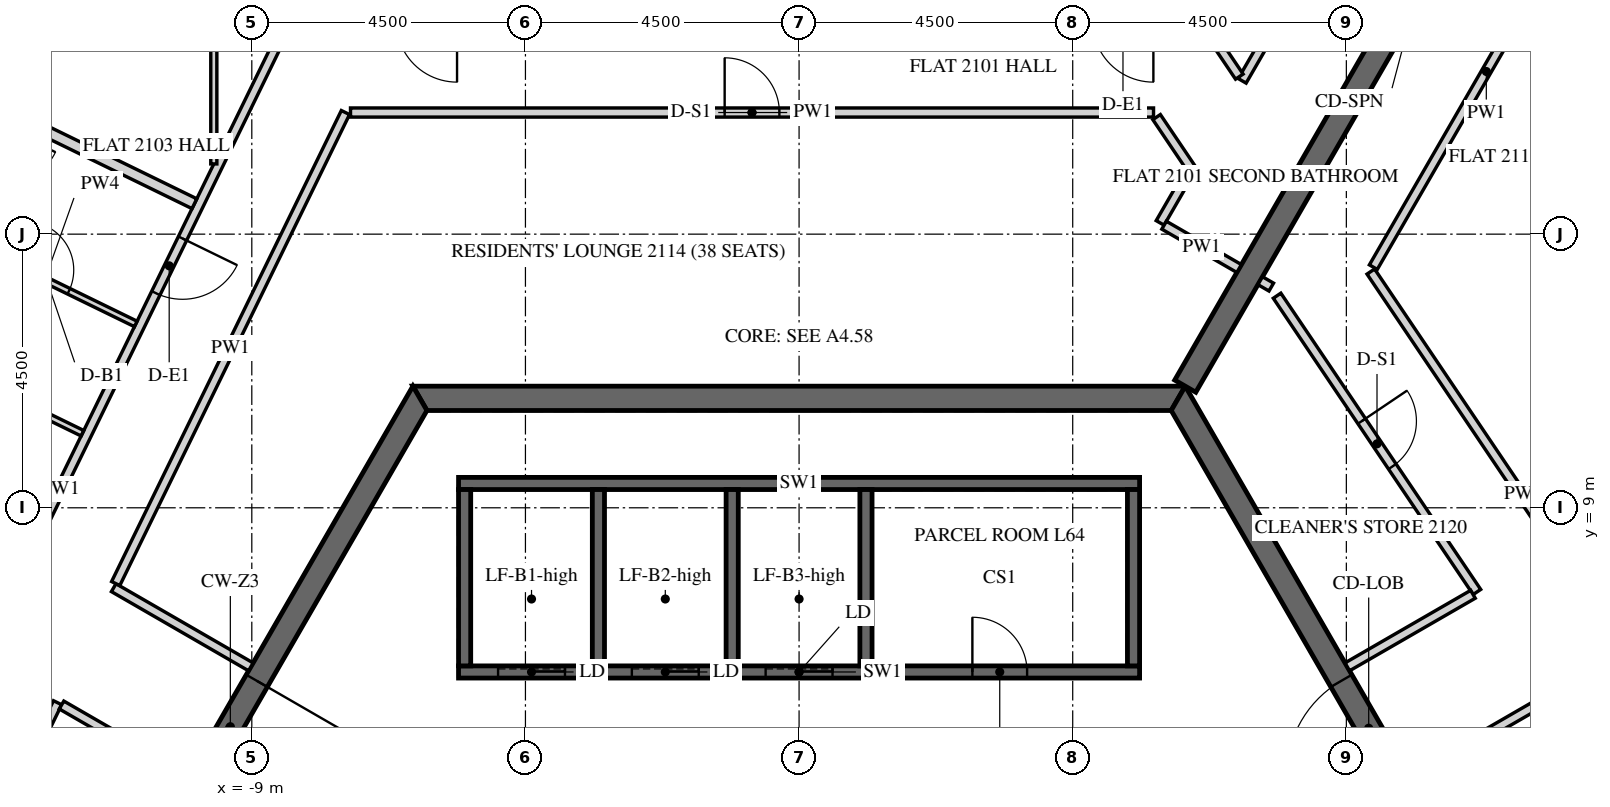
"""IFC4 building model, lengths in metres.
Left out: names, types, materials, properties, quantities, classifications, styles, units other than length and angle.
Written with IfcOpenShell. Run it as: python <this file> out.ifc"""

import sys

from ifc_helpers import new_model, si_unit, direction, frame, frame_2d, origin, place, context, subcontext, project, spatial, polyline, rectangle, outline, extrude, element, fill, save


model = new_model("IFC4")
c1 = context("Model", 3, precision=1e-05, world=origin(), true_north=direction((0.0, 1.0)))
c2 = subcontext(c1, "Body", "Model", "MODEL_VIEW")
j1 = project(units=[si_unit("LENGTHUNIT", "METRE"), si_unit("PLANEANGLEUNIT", "RADIAN")], contexts=[c1])
p1 = place(None, origin())
s1 = spatial("IfcSite", under=j1, at=p1, CompositionType="ELEMENT")
p2 = place(p1, origin())
s2 = spatial("IfcBuilding", under=s1, at=p2, CompositionType="ELEMENT")
p3 = place(p2, frame((0.0, 0.0, 267.9)))
s3 = spatial("IfcBuildingStorey", under=s2, at=p3, CompositionType="ELEMENT", Elevation=267.9)
p4 = place(p3, frame((-6.235, 10.8, -0.15), z_axis=(0.0, 0.0, 1.0), x_axis=(-0.499996419489, -0.866027470984, 0.0)))
e1 = element("IfcWall", 1, at=p4, inside=s3, PredefinedType="SHEAR", context=c2, shape_type="SweptSolid", body=[
    extrude(outline(polyline([(-0.115, -0.2), (12.586, -0.2), (12.355, 0.2), (0.115, 0.2), (-0.115, -0.2)])), origin(), (0.0, 0.0, 1.0), 3.9),
])
p5 = place(p4, frame((5.364, 0.0, 0.15)))
e2 = element("IfcOpeningElement", 2, at=p5, cuts=e1, PredefinedType="OPENING", context=c2, shape_type="SweptSolid", body=[
    extrude(rectangle(XDim=1.8, YDim=2.4, at=frame_2d((0.9, 1.2))), frame((0.0, 0.21, 0.0), z_axis=(0.0, -1.0, 0.0), x_axis=(1.0, 0.0, 0.0)), (0.0, 0.0, 1.0), 0.42),
])
p6 = place(p3, frame((12.471, 0.0, -0.15), z_axis=(0.0, 0.0, 1.0), x_axis=(-0.499996419489, 0.866027470984, 0.0)))
e3 = element("IfcWall", 3, at=p6, inside=s3, PredefinedType="SHEAR", context=c2, shape_type="SweptSolid", body=[
    extrude(outline(polyline([(-0.115, -0.2), (12.586, -0.2), (12.355, 0.2), (0.115, 0.2), (-0.115, -0.2)])), origin(), (0.0, 0.0, 1.0), 3.9),
])
p7 = place(p6, frame((5.306, 0.0, 0.15)))
e4 = element("IfcOpeningElement", 4, at=p7, cuts=e3, PredefinedType="OPENING", context=c2, shape_type="SweptSolid", body=[
    extrude(rectangle(XDim=1.8, YDim=2.4, at=frame_2d((0.9, 1.2))), frame((0.0, 0.21, 0.0), z_axis=(0.0, -1.0, 0.0), x_axis=(1.0, 0.0, 0.0)), (0.0, 0.0, 1.0), 0.42),
])
p8 = place(p3, frame((6.235, 10.8, -0.15), z_axis=(0.0, 0.0, 1.0), x_axis=(-1.0, 0.0, 0.0)))
e5 = element("IfcWall", 5, at=p8, inside=s3, PredefinedType="SHEAR", context=c2, shape_type="SweptSolid", body=[
    extrude(outline(polyline([(-0.115, -0.2), (12.586, -0.2), (12.355, 0.2), (0.115, 0.2), (-0.115, -0.2)])), origin(), (0.0, 0.0, 1.0), 3.9),
])
p9 = place(p3, frame((6.351, 11.0, -0.15), z_axis=(0.0, 0.0, 1.0), x_axis=(0.499998894578, 0.866026041999, 0.0)))
e6 = element("IfcWall", 6, at=p9, inside=s3, PredefinedType="SHEAR", context=c2, shape_type="SweptSolid", body=[
    extrude(rectangle(XDim=15.544, YDim=0.4, at=frame_2d((7.772, 0.0))), origin(), (0.0, 0.0, 1.0), 3.9),
])
p10 = place(p9, frame((6.872, 0.0, 0.15)))
e7 = element("IfcOpeningElement", 7, at=p10, cuts=e6, PredefinedType="OPENING", context=c2, shape_type="SweptSolid", body=[
    extrude(rectangle(XDim=1.8, YDim=2.4, at=frame_2d((0.9, 1.2))), frame((0.0, 0.21, 0.0), z_axis=(0.0, -1.0, 0.0), x_axis=(1.0, 0.0, 0.0)), (0.0, 0.0, 1.0), 0.42),
])
p11 = place(p3, frame((-5.6, 6.3, -0.25), z_axis=(0.0, 0.0, 1.0), x_axis=(1.0, 0.0, 0.0)))
e8 = element("IfcWall", 8, at=p11, inside=s3, PredefinedType="SHEAR", context=c2, shape_type="SweptSolid", body=[
    extrude(rectangle(XDim=11.2, YDim=0.2, at=frame_2d((5.6, 0.0))), origin(), (0.0, 0.0, 1.0), 3.9),
])
p12 = place(p11, frame((8.45, 0.0, 0.25)))
e9 = element("IfcOpeningElement", 9, at=p12, cuts=e8, PredefinedType="OPENING", context=c2, shape_type="SweptSolid", body=[
    extrude(rectangle(XDim=0.9, YDim=2.1, at=frame_2d((0.45, 1.05))), frame((0.0, 0.11, 0.0), z_axis=(0.0, -1.0, 0.0), x_axis=(1.0, 0.0, 0.0)), (0.0, 0.0, 1.0), 0.22),
])
p13 = place(p11, frame((0.65, 0.0, 0.25)))
e10 = element("IfcOpeningElement", 10, at=p13, cuts=e8, PredefinedType="OPENING", context=c2, shape_type="SweptSolid", body=[
    extrude(rectangle(XDim=1.1, YDim=2.1, at=frame_2d((0.55, 1.05))), frame((0.0, 0.11, 0.0), z_axis=(0.0, -1.0, 0.0), x_axis=(1.0, 0.0, 0.0)), (0.0, 0.0, 1.0), 0.22),
])
p14 = place(p11, frame((2.85, 0.0, 0.25)))
e11 = element("IfcOpeningElement", 11, at=p14, cuts=e8, PredefinedType="OPENING", context=c2, shape_type="SweptSolid", body=[
    extrude(rectangle(XDim=1.1, YDim=2.1, at=frame_2d((0.55, 1.05))), frame((0.0, 0.11, 0.0), z_axis=(0.0, -1.0, 0.0), x_axis=(1.0, 0.0, 0.0)), (0.0, 0.0, 1.0), 0.22),
])
p15 = place(p11, frame((5.05, 0.0, 0.25)))
e12 = element("IfcOpeningElement", 12, at=p15, cuts=e8, PredefinedType="OPENING", context=c2, shape_type="SweptSolid", body=[
    extrude(rectangle(XDim=1.1, YDim=2.1, at=frame_2d((0.55, 1.05))), frame((0.0, 0.11, 0.0), z_axis=(0.0, -1.0, 0.0), x_axis=(1.0, 0.0, 0.0)), (0.0, 0.0, 1.0), 0.22),
])
p16 = place(p3, frame((-5.6, 9.4, -0.25), z_axis=(0.0, 0.0, 1.0), x_axis=(1.0, 0.0, 0.0)))
e13 = element("IfcWall", 13, at=p16, inside=s3, PredefinedType="SHEAR", context=c2, shape_type="SweptSolid", body=[
    extrude(rectangle(XDim=11.2, YDim=0.2, at=frame_2d((5.6, 0.0))), origin(), (0.0, 0.0, 1.0), 3.9),
])
for number, where, z_axis, x_axis in (
    (14, (-5.5, 6.4, -0.25), (0.0, 0.0, 1.0), (0.0, 1.0, 0.0)),
    (15, (-3.3, 6.4, -0.25), (0.0, 0.0, 1.0), (0.0, 1.0, 0.0)),
    (16, (-1.1, 6.4, -0.25), (0.0, 0.0, 1.0), (0.0, 1.0, 0.0)),
    (17, (1.1, 6.4, -0.25), (0.0, 0.0, 1.0), (0.0, 1.0, 0.0)),
    (18, (5.5, 6.4, -0.25), (0.0, 0.0, 1.0), (0.0, 1.0, 0.0)),
):
    element("IfcWall", number, at=place(p3, frame(where, z_axis=z_axis, x_axis=x_axis)), inside=s3, PredefinedType="SHEAR", context=c2, shape_type="SweptSolid", body=[
        extrude(rectangle(XDim=2.9, YDim=0.2, at=frame_2d((1.45, 0.0))), origin(), (0.0, 0.0, 1.0), 3.9),
    ])
p17 = place(p3, frame((8.552, 18.212, 0.0), z_axis=(0.0, 0.0, 1.0), x_axis=(-0.499959175164, -0.866048972731, 0.0)))
e19 = element("IfcWall", 19, at=p17, inside=s3, PredefinedType="PARTITIONING", context=c2, shape_type="SweptSolid", body=[
    extrude(rectangle(XDim=2.53, YDim=0.15, at=frame_2d((1.265, 0.0))), origin(), (0.0, 0.0, 1.0), 2.988),
])
p18 = place(p3, frame((7.24, 16.09, 0.0), z_axis=(0.0, 0.0, 1.0), x_axis=(-0.55916880098, 0.82905382938, 0.0)))
e20 = element("IfcWall", 20, at=p18, inside=s3, PredefinedType="PARTITIONING", context=c2, shape_type="SweptSolid", body=[
    extrude(rectangle(XDim=1.007, YDim=0.15, at=frame_2d((0.503, 0.0))), origin(), (0.0, 0.0, 1.0), 2.988),
])
p19 = place(p3, frame((-8.434, 16.925, 0.0), z_axis=(0.0, 0.0, 1.0), x_axis=(-0.438371383278, -0.898793930956, 0.0)))
e21 = element("IfcWall", 21, at=p19, inside=s3, PredefinedType="PARTITIONING", context=c2, shape_type="SweptSolid", body=[
    extrude(rectangle(XDim=16.939, YDim=0.15, at=frame_2d((8.47, 0.0))), origin(), (0.0, 0.0, 1.0), 2.988),
])
p20 = place(p19, frame((3.89, 0.0, 0.0)))
e22 = element("IfcOpeningElement", 22, at=p20, cuts=e21, PredefinedType="OPENING", context=c2, shape_type="SweptSolid", body=[
    extrude(rectangle(XDim=1.0, YDim=2.1, at=frame_2d((0.5, 1.05))), frame((0.0, 0.085, 0.0), z_axis=(0.0, -1.0, 0.0), x_axis=(1.0, 0.0, 0.0)), (0.0, 0.0, 1.0), 0.17),
])
p21 = place(p3, frame((-9.016, 6.384, 0.0), z_axis=(0.0, 0.0, 1.0), x_axis=(-0.866031051173, 0.499990218309, 0.0)))
e23 = element("IfcWall", 23, at=p21, inside=s3, PredefinedType="PARTITIONING", context=c2, shape_type="SweptSolid", body=[
    extrude(rectangle(XDim=2.604, YDim=0.15, at=frame_2d((1.302, 0.0))), origin(), (0.0, 0.0, 1.0), 2.988),
])
p22 = place(p3, frame((-11.238, 7.754, 0.0), z_axis=(0.0, 0.0, 1.0), x_axis=(0.438387352899, 0.89878614187, 0.0)))
e24 = element("IfcWall", 24, at=p22, inside=s3, PredefinedType="PARTITIONING", context=c2, shape_type="SweptSolid", body=[
    extrude(rectangle(XDim=8.618, YDim=0.15, at=frame_2d((4.309, 0.0))), origin(), (0.0, 0.0, 1.0), 2.988),
])
p23 = place(p3, frame((-7.377, 15.5, 0.0), z_axis=(0.0, 0.0, 1.0), x_axis=(1.0, 0.0, 0.0)))
e25 = element("IfcWall", 25, at=p23, inside=s3, PredefinedType="PARTITIONING", context=c2, shape_type="SweptSolid", body=[
    extrude(rectangle(XDim=13.206, YDim=0.15, at=frame_2d((6.603, 0.0))), origin(), (0.0, 0.0, 1.0), 2.988),
])
p24 = place(p23, frame((6.153, 0.0, 0.0)))
e26 = element("IfcOpeningElement", 26, at=p24, cuts=e25, PredefinedType="OPENING", context=c2, shape_type="SweptSolid", body=[
    extrude(rectangle(XDim=0.9, YDim=2.1, at=frame_2d((0.45, 1.05))), frame((0.0, 0.085, 0.0), z_axis=(0.0, -1.0, 0.0), x_axis=(1.0, 0.0, 0.0)), (0.0, 0.0, 1.0), 0.17),
])
p25 = place(p3, frame((5.88, 15.425, 0.0), z_axis=(0.0, 0.0, 1.0), x_axis=(0.559202631314, -0.829031010959, 0.0)))
e27 = element("IfcWall", 27, at=p25, inside=s3, PredefinedType="PARTITIONING", context=c2, shape_type="SweptSolid", body=[
    extrude(rectangle(XDim=1.024, YDim=0.15, at=frame_2d((0.512, 0.0))), origin(), (0.0, 0.0, 1.0), 2.988),
])
p26 = place(p3, frame((6.411, 14.504, 0.0), z_axis=(0.0, 0.0, 1.0), x_axis=(-0.499998034377, -0.866026538634, 0.0)))
e28 = element("IfcWall", 28, at=p26, inside=s3, PredefinedType="PARTITIONING", context=c2, shape_type="SweptSolid", body=[
    extrude(rectangle(XDim=0.946, YDim=0.15, at=frame_2d((0.473, 0.0))), origin(), (0.0, 0.0, 1.0), 2.988),
])
p27 = place(p3, frame((6.003, 13.647, 0.0), z_axis=(0.0, 0.0, 1.0), x_axis=(0.865988727248, -0.500063520245, 0.0)))
e29 = element("IfcWall", 29, at=p27, inside=s3, PredefinedType="PARTITIONING", context=c2, shape_type="SweptSolid", body=[
    extrude(rectangle(XDim=1.425, YDim=0.15, at=frame_2d((0.712, 0.0))), origin(), (0.0, 0.0, 1.0), 2.988),
])
p28 = place(p3, frame((-14.745, 0.564, 0.0), z_axis=(0.0, 0.0, 1.0), x_axis=(0.438348416625, 0.898805132185, 0.0)))
e30 = element("IfcWall", 30, at=p28, inside=s3, PredefinedType="PARTITIONING", context=c2, shape_type="SweptSolid", body=[
    extrude(rectangle(XDim=5.82, YDim=0.15, at=frame_2d((2.91, 0.0))), origin(), (0.0, 0.0, 1.0), 2.988),
])
p29 = place(p28, frame((2.46, 0.0, 0.0)))
e31 = element("IfcOpeningElement", 31, at=p29, cuts=e30, PredefinedType="OPENING", context=c2, shape_type="SweptSolid", body=[
    extrude(rectangle(XDim=0.9, YDim=2.1, at=frame_2d((0.45, 1.05))), frame((0.0, 0.085, 0.0), z_axis=(0.0, -1.0, 0.0), x_axis=(1.0, 0.0, 0.0)), (0.0, 0.0, 1.0), 0.17),
])
p30 = place(p3, frame((-12.129, 5.757, 0.0), z_axis=(0.0, 0.0, 1.0), x_axis=(0.866033707122, -0.499985617921, 0.0)))
e32 = element("IfcWall", 32, at=p30, inside=s3, PredefinedType="PARTITIONING", context=c2, shape_type="SweptSolid", body=[
    extrude(rectangle(XDim=2.382, YDim=0.15, at=frame_2d((1.191, 0.0))), origin(), (0.0, 0.0, 1.0), 2.988),
])
p31 = place(p3, frame((18.875, -1.158, 0.0), z_axis=(0.0, 0.0, 1.0), x_axis=(-0.55919880344, 0.829033592945, 0.0)))
e33 = element("IfcWall", 33, at=p31, inside=s3, PredefinedType="PARTITIONING", context=c2, shape_type="SweptSolid", body=[
    extrude(rectangle(XDim=16.939, YDim=0.15, at=frame_2d((8.47, 0.0))), origin(), (0.0, 0.0, 1.0), 2.988),
])
p32 = place(p31, frame((9.69, 0.0, 0.0)))
e34 = element("IfcOpeningElement", 34, at=p32, cuts=e33, PredefinedType="OPENING", context=c2, shape_type="SweptSolid", body=[
    extrude(rectangle(XDim=1.0, YDim=2.1, at=frame_2d((0.5, 1.05))), frame((0.0, 0.085, 0.0), z_axis=(0.0, -1.0, 0.0), x_axis=(1.0, 0.0, 0.0)), (0.0, 0.0, 1.0), 0.17),
])
p33 = place(p3, frame((9.444, 12.957, 0.0), z_axis=(0.0, 0.0, 1.0), x_axis=(0.500004967958, 0.866022535513, 0.0)))
e35 = element("IfcWall", 35, at=p33, inside=s3, PredefinedType="PARTITIONING", context=c2, shape_type="SweptSolid", body=[
    extrude(rectangle(XDim=7.431, YDim=0.15, at=frame_2d((3.715, 0.0))), origin(), (0.0, 0.0, 1.0), 2.988),
])
p34 = place(p3, frame((10.066, 4.566, 0.0), z_axis=(0.0, 0.0, 1.0), x_axis=(0.866034402474, 0.499984413489, 0.0)))
e36 = element("IfcWall", 36, at=p34, inside=s3, PredefinedType="PARTITIONING", context=c2, shape_type="SweptSolid", body=[
    extrude(rectangle(XDim=2.608, YDim=0.15, at=frame_2d((1.304, 0.0))), origin(), (0.0, 0.0, 1.0), 2.988),
])
p35 = place(p3, frame((7.583, 12.735, 0.0), z_axis=(0.0, 0.0, 1.0), x_axis=(0.866088799389, -0.499890179513, 0.0)))
e37 = element("IfcWall", 37, at=p35, inside=s3, PredefinedType="PARTITIONING", context=c2, shape_type="SweptSolid", body=[
    extrude(rectangle(XDim=0.21, YDim=0.15, at=frame_2d((0.105, 0.0))), origin(), (0.0, 0.0, 1.0), 2.988),
])
p36 = place(p3, frame((7.861, 12.488, 0.0), z_axis=(0.0, 0.0, 1.0), x_axis=(0.559178186788, -0.829047498893, 0.0)))
e38 = element("IfcWall", 38, at=p36, inside=s3, PredefinedType="PARTITIONING", context=c2, shape_type="SweptSolid", body=[
    extrude(rectangle(XDim=5.878, YDim=0.15, at=frame_2d((2.939, 0.0))), origin(), (0.0, 0.0, 1.0), 2.988),
])
p37 = place(p36, frame((2.489, 0.0, 0.0)))
e39 = element("IfcOpeningElement", 39, at=p37, cuts=e38, PredefinedType="OPENING", context=c2, shape_type="SweptSolid", body=[
    extrude(rectangle(XDim=0.9, YDim=2.1, at=frame_2d((0.45, 1.05))), frame((0.0, 0.085, 0.0), z_axis=(0.0, -1.0, 0.0), x_axis=(1.0, 0.0, 0.0)), (0.0, 0.0, 1.0), 0.17),
])
p38 = place(p3, frame((11.082, 7.578, 0.0), z_axis=(0.0, 0.0, 1.0), x_axis=(-0.865993065409, -0.500056007527, 0.0)))
e40 = element("IfcWall", 40, at=p38, inside=s3, PredefinedType="PARTITIONING", context=c2, shape_type="SweptSolid", body=[
    extrude(rectangle(XDim=2.386, YDim=0.15, at=frame_2d((1.193, 0.0))), origin(), (0.0, 0.0, 1.0), 2.988),
])
p39 = place(p3, frame((-9.625, 14.655, 0.0), z_axis=(0.0, 0.0, 1.0), x_axis=(0.0, 1.0, 0.0)))
e41 = element("IfcWall", 41, at=p39, inside=s3, PredefinedType="PARTITIONING", context=c2, shape_type="SweptSolid", body=[
    extrude(rectangle(XDim=5.745, YDim=0.1, at=frame_2d((2.873, 0.0))), origin(), (0.0, 0.0, 1.0), 2.988),
])
p40 = place(p3, frame((-17.516, 17.694, 0.0), z_axis=(0.0, 0.0, 1.0), x_axis=(0.898788496909, -0.438382524543, 0.0)))
e42 = element("IfcWall", 42, at=p40, inside=s3, PredefinedType="PARTITIONING", context=c2, shape_type="SweptSolid", body=[
    extrude(rectangle(XDim=8.425, YDim=0.18, at=frame_2d((4.212, 0.0))), origin(), (0.0, 0.0, 1.0), 2.988),
])
p41 = place(p3, frame((-11.785, 10.226, 0.0), z_axis=(0.0, 0.0, 1.0), x_axis=(-0.898803726577, 0.438351298723, 0.0)))
e43 = element("IfcWall", 43, at=p41, inside=s3, PredefinedType="PARTITIONING", context=c2, shape_type="SweptSolid", body=[
    extrude(rectangle(XDim=3.325, YDim=0.1, at=frame_2d((1.663, 0.0))), origin(), (0.0, 0.0, 1.0), 2.988),
])
p42 = place(p3, frame((-13.897, 13.481, 0.0), z_axis=(0.0, 0.0, 1.0), x_axis=(0.898803726577, -0.438351298723, 0.0)))
e44 = element("IfcWall", 44, at=p42, inside=s3, PredefinedType="PARTITIONING", context=c2, shape_type="SweptSolid", body=[
    extrude(rectangle(XDim=3.325, YDim=0.1, at=frame_2d((1.663, 0.0))), origin(), (0.0, 0.0, 1.0), 2.988),
])
p43 = place(p42, frame((1.3, 0.0, 0.0)))
e45 = element("IfcOpeningElement", 45, at=p43, cuts=e44, PredefinedType="OPENING", context=c2, shape_type="SweptSolid", body=[
    extrude(rectangle(XDim=0.8, YDim=2.1, at=frame_2d((0.4, 1.05))), frame((0.0, 0.06, 0.0), z_axis=(0.0, -1.0, 0.0), x_axis=(1.0, 0.0, 0.0)), (0.0, 0.0, 1.0), 0.12),
])
p44 = place(p5, origin())
e46 = element("IfcDoor", 46, at=p44, inside=s3, OperationType="DOUBLE_DOOR_SINGLE_SWING", PredefinedType="DOOR", context=c2, shape_type="SweptSolid", body=[
    extrude(rectangle(XDim=1.8, YDim=2.4, at=frame_2d((0.9, 1.2))), frame((0.0, 0.025, 0.0), z_axis=(0.0, -1.0, 0.0), x_axis=(1.0, 0.0, 0.0)), (0.0, 0.0, 1.0), 0.05),
])
fill(e2, e46)
p45 = place(p7, origin())
e47 = element("IfcDoor", 47, at=p45, inside=s3, OperationType="DOUBLE_DOOR_SINGLE_SWING", PredefinedType="DOOR", context=c2, shape_type="SweptSolid", body=[
    extrude(rectangle(XDim=1.8, YDim=2.4, at=frame_2d((0.9, 1.2))), frame((0.0, 0.025, 0.0), z_axis=(0.0, -1.0, 0.0), x_axis=(1.0, 0.0, 0.0)), (0.0, 0.0, 1.0), 0.05),
])
fill(e4, e47)
p46 = place(p12, origin())
e48 = element("IfcDoor", 48, at=p46, inside=s3, OperationType="SINGLE_SWING_LEFT", PredefinedType="DOOR", context=c2, shape_type="SweptSolid", body=[
    extrude(rectangle(XDim=0.9, YDim=2.1, at=frame_2d((0.45, 1.05))), frame((0.0, 0.025, 0.0), z_axis=(0.0, -1.0, 0.0), x_axis=(1.0, 0.0, 0.0)), (0.0, 0.0, 1.0), 0.05),
])
fill(e9, e48)
p47 = place(p13, origin())
e49 = element("IfcDoor", 49, at=p47, inside=s3, OperationType="SLIDING_TO_LEFT", PredefinedType="DOOR", context=c2, shape_type="SweptSolid", body=[
    extrude(rectangle(XDim=1.1, YDim=2.1, at=frame_2d((0.55, 1.05))), frame((0.0, 0.025, 0.0), z_axis=(0.0, -1.0, 0.0), x_axis=(1.0, 0.0, 0.0)), (0.0, 0.0, 1.0), 0.05),
])
fill(e10, e49)
p48 = place(p14, origin())
e50 = element("IfcDoor", 50, at=p48, inside=s3, OperationType="SLIDING_TO_LEFT", PredefinedType="DOOR", context=c2, shape_type="SweptSolid", body=[
    extrude(rectangle(XDim=1.1, YDim=2.1, at=frame_2d((0.55, 1.05))), frame((0.0, 0.025, 0.0), z_axis=(0.0, -1.0, 0.0), x_axis=(1.0, 0.0, 0.0)), (0.0, 0.0, 1.0), 0.05),
])
fill(e11, e50)
p49 = place(p15, origin())
e51 = element("IfcDoor", 51, at=p49, inside=s3, OperationType="SLIDING_TO_LEFT", PredefinedType="DOOR", context=c2, shape_type="SweptSolid", body=[
    extrude(rectangle(XDim=1.1, YDim=2.1, at=frame_2d((0.55, 1.05))), frame((0.0, 0.025, 0.0), z_axis=(0.0, -1.0, 0.0), x_axis=(1.0, 0.0, 0.0)), (0.0, 0.0, 1.0), 0.05),
])
fill(e12, e51)
p50 = place(p20, origin())
e52 = element("IfcDoor", 52, at=p50, inside=s3, OperationType="SINGLE_SWING_RIGHT", PredefinedType="DOOR", context=c2, shape_type="SweptSolid", body=[
    extrude(rectangle(XDim=1.0, YDim=2.1, at=frame_2d((0.5, 1.05))), frame((0.0, 0.025, 0.0), z_axis=(0.0, -1.0, 0.0), x_axis=(1.0, 0.0, 0.0)), (0.0, 0.0, 1.0), 0.05),
])
fill(e22, e52)
p51 = place(p43, origin())
e53 = element("IfcDoor", 53, at=p51, inside=s3, OperationType="SINGLE_SWING_LEFT", PredefinedType="DOOR", context=c2, shape_type="SweptSolid", body=[
    extrude(rectangle(XDim=0.8, YDim=2.1, at=frame_2d((0.4, 1.05))), frame((0.0, 0.025, 0.0), z_axis=(0.0, -1.0, 0.0), x_axis=(1.0, 0.0, 0.0)), (0.0, 0.0, 1.0), 0.05),
])
fill(e45, e53)
p52 = place(p24, origin())
e54 = element("IfcDoor", 54, at=p52, inside=s3, OperationType="SINGLE_SWING_LEFT", PredefinedType="DOOR", context=c2, shape_type="SweptSolid", body=[
    extrude(rectangle(XDim=0.9, YDim=2.1, at=frame_2d((0.45, 1.05))), frame((0.0, 0.025, 0.0), z_axis=(0.0, -1.0, 0.0), x_axis=(1.0, 0.0, 0.0)), (0.0, 0.0, 1.0), 0.05),
])
fill(e26, e54)
p53 = place(p37, origin())
e55 = element("IfcDoor", 55, at=p53, inside=s3, OperationType="SINGLE_SWING_RIGHT", PredefinedType="DOOR", context=c2, shape_type="SweptSolid", body=[
    extrude(rectangle(XDim=0.9, YDim=2.1, at=frame_2d((0.45, 1.05))), frame((0.0, 0.025, 0.0), z_axis=(0.0, -1.0, 0.0), x_axis=(1.0, 0.0, 0.0)), (0.0, 0.0, 1.0), 0.05),
])
fill(e39, e55)
save(model, sys.argv[1])
